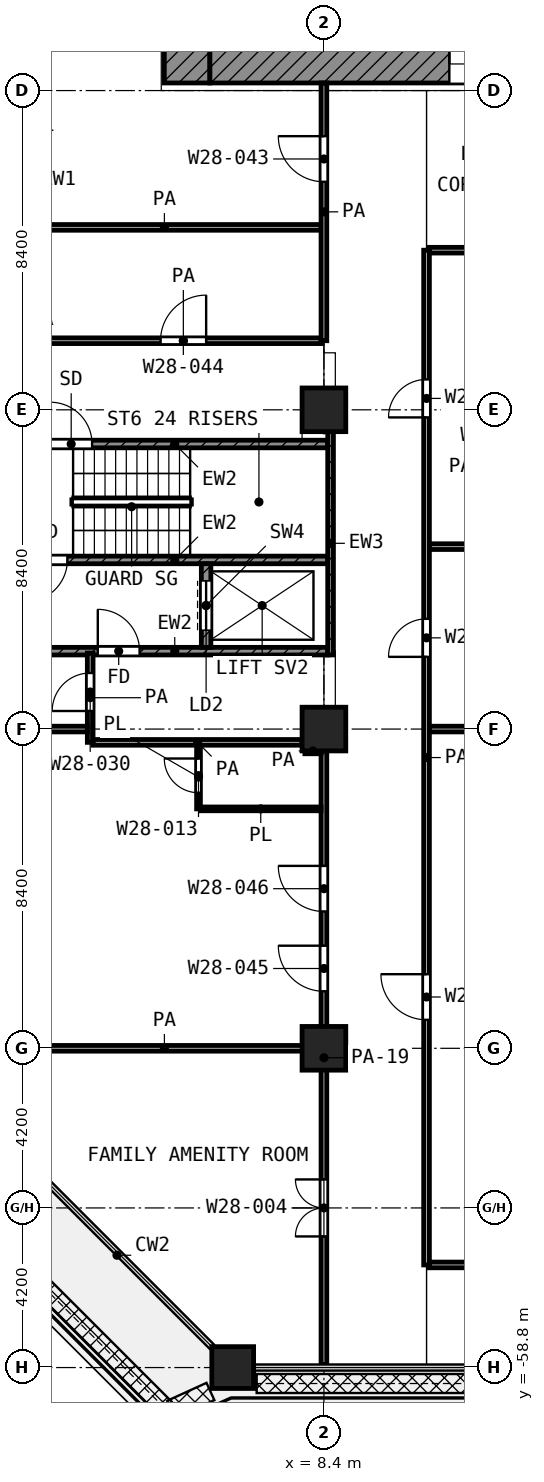
"""IFC4 building model, lengths in metres.
Left out: names, types, materials, properties, quantities, classifications, styles, units other than length and angle.
Written with IfcOpenShell. Run it as: python <this file> out.ifc"""

import sys

from ifc_helpers import new_model, si_unit, direction, frame, frame_2d, origin, origin_2d, place, context, subcontext, project, spatial, rectangle, extrude, element, fill, save


model = new_model("IFC4")
c1 = context("Model", 3, precision=1e-05, world=origin(), true_north=direction((0.0, 1.0)))
c2 = subcontext(c1, "Body", "Model", "MODEL_VIEW")
j1 = project(units=[si_unit("LENGTHUNIT", "METRE"), si_unit("PLANEANGLEUNIT", "RADIAN")], contexts=[c1])
p1 = place(None, origin())
s1 = spatial("IfcSite", under=j1, at=p1, CompositionType="ELEMENT")
p2 = place(p1, origin())
s2 = spatial("IfcBuilding", under=s1, at=p2, CompositionType="ELEMENT")
p3 = place(p2, frame((0.0, 0.0, 124.0)))
s3 = spatial("IfcBuildingStorey", under=s2, at=p3, CompositionType="ELEMENT", Elevation=124.0)
for number, where, z_axis, x_axis in (
    (1, (8.4, -33.6, 0.0), (0.0, 0.0, 1.0), (1.0, 0.0, 0.0)),
    (2, (8.4, -42.0, 0.0), (0.0, 0.0, 1.0), (1.0, 0.0, 0.0)),
    (3, (8.4, -50.4, 0.0), (0.0, 0.0, 1.0), (1.0, 0.0, 0.0)),
):
    element("IfcColumn", number, at=place(p3, frame(where, z_axis=z_axis, x_axis=x_axis)), inside=s3, PredefinedType="COLUMN", context=c2, shape_type="SweptSolid", body=[
        extrude(rectangle(XDim=1.15, YDim=1.15, at=origin_2d()), origin(), (0.0, 0.0, 1.0), 4.2),
    ])
p4 = place(p3, frame((6.0, -58.8, 0.0), z_axis=(0.0, 0.0, 1.0), x_axis=(1.0, 0.0, 0.0)))
e4 = element("IfcColumn", 4, at=p4, inside=s3, PredefinedType="COLUMN", context=c2, shape_type="SweptSolid", body=[
    extrude(rectangle(XDim=1.1, YDim=1.1, at=origin_2d()), origin(), (0.0, 0.0, 1.0), 4.2),
])
p5 = place(p3, frame((4.8, -25.0, 0.0), z_axis=(0.0, 0.0, 1.0), x_axis=(0.0, 1.0, 0.0)))
e5 = element("IfcWall", 5, at=p5, inside=s3, PredefinedType="SHEAR", context=c2, shape_type="SweptSolid", body=[
    extrude(rectangle(XDim=19.6, YDim=1.2, at=frame_2d((9.8, 0.0))), origin(), (0.0, 0.0, 1.0), 3.6),
])
p6 = place(p5, frame((11.45, 0.0, 0.0)))
e6 = element("IfcOpeningElement", 6, at=p6, cuts=e5, PredefinedType="OPENING", context=c2, shape_type="SweptSolid", body=[
    extrude(rectangle(XDim=1.1, YDim=2.1, at=frame_2d((0.55, 1.05))), frame((0.0, 0.61, 0.0), z_axis=(0.0, -1.0, 0.0), x_axis=(1.0, 0.0, 0.0)), (0.0, 0.0, 1.0), 1.22),
])
p7 = place(p5, frame((2.15, 0.0, 0.0)))
e7 = element("IfcOpeningElement", 7, at=p7, cuts=e5, PredefinedType="OPENING", context=c2, shape_type="SweptSolid", body=[
    extrude(rectangle(XDim=1.1, YDim=2.1, at=frame_2d((0.55, 1.05))), frame((0.0, 0.61, 0.0), z_axis=(0.0, -1.0, 0.0), x_axis=(1.0, 0.0, 0.0)), (0.0, 0.0, 1.0), 1.22),
])
p8 = place(p3, frame((5.4, -24.5, 0.0), z_axis=(0.0, 0.0, 1.0), x_axis=(1.0, 0.0, 0.0)))
e8 = element("IfcWall", 8, at=p8, inside=s3, PredefinedType="SHEAR", context=c2, shape_type="SweptSolid", body=[
    extrude(rectangle(XDim=18.6, YDim=1.0, at=frame_2d((9.3, 0.0))), origin(), (0.0, 0.0, 1.0), 3.6),
])
p9 = place(p8, frame((6.3, 0.0, 0.0)))
e9 = element("IfcOpeningElement", 9, at=p9, cuts=e8, PredefinedType="OPENING", context=c2, shape_type="SweptSolid", body=[
    extrude(rectangle(XDim=1.8, YDim=2.1, at=frame_2d((0.9, 1.05))), frame((0.0, 0.51, 0.0), z_axis=(0.0, -1.0, 0.0), x_axis=(1.0, 0.0, 0.0)), (0.0, 0.0, 1.0), 1.02),
])
p10 = place(p3, frame((8.575, -40.05, 0.0), z_axis=(0.0, 0.0, 1.0), x_axis=(0.0, 1.0, 0.0)))
e10 = element("IfcWall", 10, at=p10, inside=s3, PredefinedType="SHEAR", context=c2, shape_type="SweptSolid", body=[
    extrude(rectangle(XDim=5.875, YDim=0.15, at=frame_2d((2.938, 0.0))), origin(), (0.0, 0.0, 1.0), 3.6),
])
p11 = place(p3, frame((0.45, -34.5, 0.0), z_axis=(0.0, 0.0, 1.0), x_axis=(1.0, 0.0, 0.0)))
e11 = element("IfcWall", 11, at=p11, inside=s3, PredefinedType="SHEAR", context=c2, shape_type="SweptSolid", body=[
    extrude(rectangle(XDim=8.05, YDim=0.2, at=frame_2d((4.025, 0.0))), origin(), (0.0, 0.0, 1.0), 3.6),
])
p12 = place(p11, frame((0.75, 0.0, 0.0)))
e12 = element("IfcOpeningElement", 12, at=p12, cuts=e11, PredefinedType="OPENING", context=c2, shape_type="SweptSolid", body=[
    extrude(rectangle(XDim=1.1, YDim=2.1, at=frame_2d((0.55, 1.05))), frame((0.0, 0.11, 0.0), z_axis=(0.0, -1.0, 0.0), x_axis=(1.0, 0.0, 0.0)), (0.0, 0.0, 1.0), 0.22),
])
p13 = place(p3, frame((0.45, -37.55, 0.0), z_axis=(0.0, 0.0, 1.0), x_axis=(1.0, 0.0, 0.0)))
e13 = element("IfcWall", 13, at=p13, inside=s3, PredefinedType="SHEAR", context=c2, shape_type="SweptSolid", body=[
    extrude(rectangle(XDim=8.05, YDim=0.2, at=frame_2d((4.025, 0.0))), origin(), (0.0, 0.0, 1.0), 3.6),
])
p14 = place(p13, frame((0.1, 0.0, 0.0)))
e14 = element("IfcOpeningElement", 14, at=p14, cuts=e13, PredefinedType="OPENING", context=c2, shape_type="SweptSolid", body=[
    extrude(rectangle(XDim=1.1, YDim=2.1, at=frame_2d((0.55, 1.05))), frame((0.0, 0.11, 0.0), z_axis=(0.0, -1.0, 0.0), x_axis=(1.0, 0.0, 0.0)), (0.0, 0.0, 1.0), 0.22),
])
p15 = place(p3, frame((0.45, -39.95, 0.0), z_axis=(0.0, 0.0, 1.0), x_axis=(1.0, 0.0, 0.0)))
e15 = element("IfcWall", 15, at=p15, inside=s3, PredefinedType="SHEAR", context=c2, shape_type="SweptSolid", body=[
    extrude(rectangle(XDim=8.05, YDim=0.2, at=frame_2d((4.025, 0.0))), origin(), (0.0, 0.0, 1.0), 3.6),
])
p16 = place(p15, frame((2.0, 0.0, 0.0)))
e16 = element("IfcOpeningElement", 16, at=p16, cuts=e15, PredefinedType="OPENING", context=c2, shape_type="SweptSolid", body=[
    extrude(rectangle(XDim=1.1, YDim=2.1, at=frame_2d((0.55, 1.05))), frame((0.0, 0.11, 0.0), z_axis=(0.0, -1.0, 0.0), x_axis=(1.0, 0.0, 0.0)), (0.0, 0.0, 1.0), 0.22),
])
p17 = place(p3, frame((5.3, -39.85, 0.0), z_axis=(0.0, 0.0, 1.0), x_axis=(0.0, 1.0, 0.0)))
e17 = element("IfcWall", 17, at=p17, inside=s3, PredefinedType="SHEAR", context=c2, shape_type="SweptSolid", body=[
    extrude(rectangle(XDim=2.2, YDim=0.25, at=frame_2d((1.1, 0.0))), origin(), (0.0, 0.0, 1.0), 3.6),
])
p18 = place(p17, frame((0.45, 0.0, 0.0)))
e18 = element("IfcOpeningElement", 18, at=p18, cuts=e17, PredefinedType="OPENING", context=c2, shape_type="SweptSolid", body=[
    extrude(rectangle(XDim=1.3, YDim=2.1, at=frame_2d((0.65, 1.05))), frame((0.0, 0.135, 0.0), z_axis=(0.0, -1.0, 0.0), x_axis=(1.0, 0.0, 0.0)), (0.0, 0.0, 1.0), 0.27),
])
p19 = place(p3, frame((5.15, -44.1, 0.0), z_axis=(0.0, 0.0, 1.0), x_axis=(1.0, 0.0, 0.0)))
e19 = element("IfcWall", 19, at=p19, inside=s3, PredefinedType="PARTITIONING", context=c2, shape_type="SweptSolid", body=[
    extrude(rectangle(XDim=3.175, YDim=0.1, at=frame_2d((1.587, 0.0))), origin(), (0.0, 0.0, 1.0), 3.6),
])
p20 = place(p3, frame((5.1, -44.1, 0.0), z_axis=(0.0, 0.0, 1.0), x_axis=(0.0, 1.0, 0.0)))
e20 = element("IfcWall", 20, at=p20, inside=s3, PredefinedType="PARTITIONING", context=c2, shape_type="SweptSolid", body=[
    extrude(rectangle(XDim=1.675, YDim=0.1, at=frame_2d((0.837, 0.0))), origin(), (0.0, 0.0, 1.0), 3.6),
])
p21 = place(p20, frame((0.425, 0.0, 0.0)))
e21 = element("IfcOpeningElement", 21, at=p21, cuts=e20, PredefinedType="OPENING", context=c2, shape_type="SweptSolid", body=[
    extrude(rectangle(XDim=0.9, YDim=2.1, at=frame_2d((0.45, 1.05))), frame((0.0, 0.06, 0.0), z_axis=(0.0, -1.0, 0.0), x_axis=(1.0, 0.0, 0.0)), (0.0, 0.0, 1.0), 0.12),
])
p22 = place(p3, frame((11.175, -56.1, 0.0), z_axis=(0.0, 0.0, 1.0), x_axis=(1.0, 0.0, 0.0)))
e22 = element("IfcWall", 22, at=p22, inside=s3, PredefinedType="PARTITIONING", context=c2, shape_type="SweptSolid", body=[
    extrude(rectangle(XDim=2.85, YDim=0.15, at=frame_2d((1.425, 0.0))), origin(), (0.0, 0.0, 1.0), 3.6),
])
p23 = place(p3, frame((0.08, -50.4, 0.0), z_axis=(0.0, 0.0, 1.0), x_axis=(1.0, 0.0, 0.0)))
e23 = element("IfcWall", 23, at=p23, inside=s3, PredefinedType="PARTITIONING", context=c2, shape_type="SweptSolid", body=[
    extrude(rectangle(XDim=8.245, YDim=0.15, at=frame_2d((4.123, 0.0))), origin(), (0.0, 0.0, 1.0), 3.6),
])
p24 = place(p3, frame((7.9, -42.575, 0.0), z_axis=(0.0, 0.0, 1.0), x_axis=(1.0, 0.0, 0.0)))
e24 = element("IfcWall", 24, at=p24, inside=s3, PredefinedType="PARTITIONING", context=c2, shape_type="SweptSolid", body=[
    extrude(rectangle(XDim=0.425, YDim=0.15, at=frame_2d((0.212, 0.0))), origin(), (0.0, 0.0, 1.0), 3.6),
])
p25 = place(p3, frame((2.325, -42.35, 0.0), z_axis=(0.0, 0.0, 1.0), x_axis=(1.0, 0.0, 0.0)))
e25 = element("IfcWall", 25, at=p25, inside=s3, PredefinedType="PARTITIONING", context=c2, shape_type="SweptSolid", body=[
    extrude(rectangle(XDim=5.498, YDim=0.15, at=frame_2d((2.749, 0.0))), origin(), (0.0, 0.0, 1.0), 3.6),
])
p26 = place(p3, frame((0.08, -42.0, 0.0), z_axis=(0.0, 0.0, 1.0), x_axis=(1.0, 0.0, 0.0)))
e26 = element("IfcWall", 26, at=p26, inside=s3, PredefinedType="PARTITIONING", context=c2, shape_type="SweptSolid", body=[
    extrude(rectangle(XDim=2.095, YDim=0.15, at=frame_2d((1.047, 0.0))), origin(), (0.0, 0.0, 1.0), 3.6),
])
for number, where, z_axis, x_axis in (
    (27, (11.175, -42.0, 0.0), (0.0, 0.0, 1.0), (1.0, 0.0, 0.0)),
    (28, (11.175, -37.2, 0.0), (0.0, 0.0, 1.0), (1.0, 0.0, 0.0)),
):
    element("IfcWall", number, at=place(p3, frame(where, z_axis=z_axis, x_axis=x_axis)), inside=s3, PredefinedType="PARTITIONING", context=c2, shape_type="SweptSolid", body=[
        extrude(rectangle(XDim=2.85, YDim=0.15, at=frame_2d((1.425, 0.0))), origin(), (0.0, 0.0, 1.0), 3.6),
    ])
p27 = place(p3, frame((1.077, -31.782, 0.0), z_axis=(0.0, 0.0, 1.0), x_axis=(1.0, 0.0, 0.0)))
e29 = element("IfcWall", 29, at=p27, inside=s3, PredefinedType="PARTITIONING", context=c2, shape_type="SweptSolid", body=[
    extrude(rectangle(XDim=7.248, YDim=0.15, at=frame_2d((3.624, 0.0))), origin(), (0.0, 0.0, 1.0), 3.6),
])
p28 = place(p27, frame((3.024, 0.0, 0.0)))
e30 = element("IfcOpeningElement", 30, at=p28, cuts=e29, PredefinedType="OPENING", context=c2, shape_type="SweptSolid", body=[
    extrude(rectangle(XDim=1.2, YDim=2.1, at=frame_2d((0.6, 1.05))), frame((0.0, 0.085, 0.0), z_axis=(0.0, -1.0, 0.0), x_axis=(1.0, 0.0, 0.0)), (0.0, 0.0, 1.0), 0.17),
])
p29 = place(p3, frame((11.175, -29.4, 0.0), z_axis=(0.0, 0.0, 1.0), x_axis=(1.0, 0.0, 0.0)))
e31 = element("IfcWall", 31, at=p29, inside=s3, PredefinedType="PARTITIONING", context=c2, shape_type="SweptSolid", body=[
    extrude(rectangle(XDim=2.85, YDim=0.15, at=frame_2d((1.425, 0.0))), origin(), (0.0, 0.0, 1.0), 3.6),
])
p30 = place(p3, frame((0.08, -28.8, 0.0), z_axis=(0.0, 0.0, 1.0), x_axis=(1.0, 0.0, 0.0)))
e32 = element("IfcWall", 32, at=p30, inside=s3, PredefinedType="PARTITIONING", context=c2, shape_type="SweptSolid", body=[
    extrude(rectangle(XDim=8.245, YDim=0.15, at=frame_2d((4.123, 0.0))), origin(), (0.0, 0.0, 1.0), 3.6),
])
p31 = place(p3, frame((2.25, -42.35, 0.0), z_axis=(0.0, 0.0, 1.0), x_axis=(0.0, 1.0, 0.0)))
e33 = element("IfcWall", 33, at=p31, inside=s3, PredefinedType="PARTITIONING", context=c2, shape_type="SweptSolid", body=[
    extrude(rectangle(XDim=2.35, YDim=0.15, at=frame_2d((1.175, 0.0))), origin(), (0.0, 0.0, 1.0), 3.6),
])
p32 = place(p31, frame((0.825, 0.0, 0.0)))
e34 = element("IfcOpeningElement", 34, at=p32, cuts=e33, PredefinedType="OPENING", context=c2, shape_type="SweptSolid", body=[
    extrude(rectangle(XDim=1.0, YDim=2.1, at=frame_2d((0.5, 1.05))), frame((0.0, 0.085, 0.0), z_axis=(0.0, -1.0, 0.0), x_axis=(1.0, 0.0, 0.0)), (0.0, 0.0, 1.0), 0.17),
])
p33 = place(p3, frame((8.4, -58.72, 0.0), z_axis=(0.0, 0.0, 1.0), x_axis=(0.0, 1.0, 0.0)))
e35 = element("IfcWall", 35, at=p33, inside=s3, PredefinedType="PARTITIONING", context=c2, shape_type="SweptSolid", body=[
    extrude(rectangle(XDim=16.145, YDim=0.15, at=frame_2d((8.073, 0.0))), origin(), (0.0, 0.0, 1.0), 2.7),
])
p34 = place(p33, frame((9.82, 0.0, 0.0)))
e36 = element("IfcOpeningElement", 36, at=p34, cuts=e35, PredefinedType="OPENING", context=c2, shape_type="SweptSolid", body=[
    extrude(rectangle(XDim=1.2, YDim=2.1, at=frame_2d((0.6, 1.05))), frame((0.0, 0.085, 0.0), z_axis=(0.0, -1.0, 0.0), x_axis=(1.0, 0.0, 0.0)), (0.0, 0.0, 1.0), 0.17),
])
p35 = place(p33, frame((11.92, 0.0, 0.0)))
e37 = element("IfcOpeningElement", 37, at=p35, cuts=e35, PredefinedType="OPENING", context=c2, shape_type="SweptSolid", body=[
    extrude(rectangle(XDim=1.2, YDim=2.1, at=frame_2d((0.6, 1.05))), frame((0.0, 0.085, 0.0), z_axis=(0.0, -1.0, 0.0), x_axis=(1.0, 0.0, 0.0)), (0.0, 0.0, 1.0), 0.17),
])
p36 = place(p33, frame((3.37, 0.0, 0.0)))
e38 = element("IfcOpeningElement", 38, at=p36, cuts=e35, PredefinedType="OPENING", context=c2, shape_type="SweptSolid", body=[
    extrude(rectangle(XDim=1.5, YDim=2.1, at=frame_2d((0.75, 1.05))), frame((0.0, 0.085, 0.0), z_axis=(0.0, -1.0, 0.0), x_axis=(1.0, 0.0, 0.0)), (0.0, 0.0, 1.0), 0.17),
])
p37 = place(p3, frame((8.4, -31.782, 0.0), z_axis=(0.0, 0.0, 1.0), x_axis=(0.0, 1.0, 0.0)))
e39 = element("IfcWall", 39, at=p37, inside=s3, PredefinedType="PARTITIONING", context=c2, shape_type="SweptSolid", body=[
    extrude(rectangle(XDim=6.782, YDim=0.15, at=frame_2d((3.391, 0.0))), origin(), (0.0, 0.0, 1.0), 3.6),
])
p38 = place(p37, frame((4.182, 0.0, 0.0)))
e40 = element("IfcOpeningElement", 40, at=p38, cuts=e39, PredefinedType="OPENING", context=c2, shape_type="SweptSolid", body=[
    extrude(rectangle(XDim=1.2, YDim=2.1, at=frame_2d((0.6, 1.05))), frame((0.0, 0.085, 0.0), z_axis=(0.0, -1.0, 0.0), x_axis=(1.0, 0.0, 0.0)), (0.0, 0.0, 1.0), 0.17),
])
p39 = place(p3, frame((11.1, -56.1, 0.0), z_axis=(0.0, 0.0, 1.0), x_axis=(0.0, 1.0, 0.0)))
e41 = element("IfcWall", 41, at=p39, inside=s3, PredefinedType="PARTITIONING", context=c2, shape_type="SweptSolid", body=[
    extrude(rectangle(XDim=26.7, YDim=0.15, at=frame_2d((13.35, 0.0))), origin(), (0.0, 0.0, 1.0), 3.6),
])
p40 = place(p39, frame((22.3, 0.0, 0.0)))
e42 = element("IfcOpeningElement", 42, at=p40, cuts=e41, PredefinedType="OPENING", context=c2, shape_type="SweptSolid", body=[
    extrude(rectangle(XDim=1.0, YDim=2.1, at=frame_2d((0.5, 1.05))), frame((0.0, 0.085, 0.0), z_axis=(0.0, -1.0, 0.0), x_axis=(1.0, 0.0, 0.0)), (0.0, 0.0, 1.0), 0.17),
])
p41 = place(p39, frame((16.0, 0.0, 0.0)))
e43 = element("IfcOpeningElement", 43, at=p41, cuts=e41, PredefinedType="OPENING", context=c2, shape_type="SweptSolid", body=[
    extrude(rectangle(XDim=1.0, YDim=2.1, at=frame_2d((0.5, 1.05))), frame((0.0, 0.085, 0.0), z_axis=(0.0, -1.0, 0.0), x_axis=(1.0, 0.0, 0.0)), (0.0, 0.0, 1.0), 0.17),
])
p42 = place(p39, frame((6.45, 0.0, 0.0)))
e44 = element("IfcOpeningElement", 44, at=p42, cuts=e41, PredefinedType="OPENING", context=c2, shape_type="SweptSolid", body=[
    extrude(rectangle(XDim=1.2, YDim=2.1, at=frame_2d((0.6, 1.05))), frame((0.0, 0.085, 0.0), z_axis=(0.0, -1.0, 0.0), x_axis=(1.0, 0.0, 0.0)), (0.0, 0.0, 1.0), 0.17),
])
p43 = place(p9, origin())
e45 = element("IfcDoor", 45, at=p43, inside=s3, OperationType="DOUBLE_DOOR_SINGLE_SWING", PredefinedType="DOOR", context=c2, shape_type="SweptSolid", body=[
    extrude(rectangle(XDim=1.8, YDim=2.1, at=frame_2d((0.9, 1.05))), frame((0.0, 0.025, 0.0), z_axis=(0.0, -1.0, 0.0), x_axis=(1.0, 0.0, 0.0)), (0.0, 0.0, 1.0), 0.05),
])
fill(e9, e45)
p44 = place(p12, origin())
e46 = element("IfcDoor", 46, at=p44, inside=s3, OperationType="SINGLE_SWING_LEFT", PredefinedType="DOOR", context=c2, shape_type="SweptSolid", body=[
    extrude(rectangle(XDim=1.1, YDim=2.1, at=frame_2d((0.55, 1.05))), frame((0.0, 0.025, 0.0), z_axis=(0.0, -1.0, 0.0), x_axis=(1.0, 0.0, 0.0)), (0.0, 0.0, 1.0), 0.05),
])
fill(e12, e46)
p45 = place(p14, frame((1.1, 0.0, 0.0), z_axis=(0.0, 0.0, 1.0), x_axis=(-1.0, 0.0, 0.0)))
e47 = element("IfcDoor", 47, at=p45, inside=s3, OperationType="SINGLE_SWING_LEFT", PredefinedType="DOOR", context=c2, shape_type="SweptSolid", body=[
    extrude(rectangle(XDim=1.1, YDim=2.1, at=frame_2d((0.55, 1.05))), frame((0.0, 0.025, 0.0), z_axis=(0.0, -1.0, 0.0), x_axis=(1.0, 0.0, 0.0)), (0.0, 0.0, 1.0), 0.05),
])
fill(e14, e47)
p46 = place(p18, origin())
e48 = element("IfcDoor", 48, at=p46, inside=s3, OperationType="DOUBLE_DOOR_SLIDING", PredefinedType="DOOR", context=c2, shape_type="SweptSolid", body=[
    extrude(rectangle(XDim=1.3, YDim=2.1, at=frame_2d((0.65, 1.05))), frame((0.0, 0.025, 0.0), z_axis=(0.0, -1.0, 0.0), x_axis=(1.0, 0.0, 0.0)), (0.0, 0.0, 1.0), 0.05),
])
fill(e18, e48)
p47 = place(p16, origin())
e49 = element("IfcDoor", 49, at=p47, inside=s3, OperationType="SINGLE_SWING_LEFT", PredefinedType="DOOR", context=c2, shape_type="SweptSolid", body=[
    extrude(rectangle(XDim=1.1, YDim=2.1, at=frame_2d((0.55, 1.05))), frame((0.0, 0.025, 0.0), z_axis=(0.0, -1.0, 0.0), x_axis=(1.0, 0.0, 0.0)), (0.0, 0.0, 1.0), 0.05),
])
fill(e16, e49)
p48 = place(p38, origin())
e50 = element("IfcDoor", 50, at=p48, inside=s3, OperationType="SINGLE_SWING_RIGHT", PredefinedType="DOOR", context=c2, shape_type="SweptSolid", body=[
    extrude(rectangle(XDim=1.2, YDim=2.1, at=frame_2d((0.6, 1.05))), frame((0.0, 0.025, 0.0), z_axis=(0.0, -1.0, 0.0), x_axis=(1.0, 0.0, 0.0)), (0.0, 0.0, 1.0), 0.05),
])
fill(e40, e50)
p49 = place(p28, origin())
e51 = element("IfcDoor", 51, at=p49, inside=s3, OperationType="SINGLE_SWING_RIGHT", PredefinedType="DOOR", context=c2, shape_type="SweptSolid", body=[
    extrude(rectangle(XDim=1.2, YDim=2.1, at=frame_2d((0.6, 1.05))), frame((0.0, 0.025, 0.0), z_axis=(0.0, -1.0, 0.0), x_axis=(1.0, 0.0, 0.0)), (0.0, 0.0, 1.0), 0.05),
])
fill(e30, e51)
p50 = place(p32, origin())
e52 = element("IfcDoor", 52, at=p50, inside=s3, OperationType="SINGLE_SWING_LEFT", PredefinedType="DOOR", context=c2, shape_type="SweptSolid", body=[
    extrude(rectangle(XDim=1.0, YDim=2.1, at=frame_2d((0.5, 1.05))), frame((0.0, 0.025, 0.0), z_axis=(0.0, -1.0, 0.0), x_axis=(1.0, 0.0, 0.0)), (0.0, 0.0, 1.0), 0.05),
])
fill(e34, e52)
p51 = place(p34, origin())
e53 = element("IfcDoor", 53, at=p51, inside=s3, OperationType="SINGLE_SWING_RIGHT", PredefinedType="DOOR", context=c2, shape_type="SweptSolid", body=[
    extrude(rectangle(XDim=1.2, YDim=2.1, at=frame_2d((0.6, 1.05))), frame((0.0, 0.025, 0.0), z_axis=(0.0, -1.0, 0.0), x_axis=(1.0, 0.0, 0.0)), (0.0, 0.0, 1.0), 0.05),
])
fill(e36, e53)
p52 = place(p35, origin())
e54 = element("IfcDoor", 54, at=p52, inside=s3, OperationType="SINGLE_SWING_RIGHT", PredefinedType="DOOR", context=c2, shape_type="SweptSolid", body=[
    extrude(rectangle(XDim=1.2, YDim=2.1, at=frame_2d((0.6, 1.05))), frame((0.0, 0.025, 0.0), z_axis=(0.0, -1.0, 0.0), x_axis=(1.0, 0.0, 0.0)), (0.0, 0.0, 1.0), 0.05),
])
fill(e37, e54)
p53 = place(p21, origin())
e55 = element("IfcDoor", 55, at=p53, inside=s3, OperationType="SINGLE_SWING_RIGHT", PredefinedType="DOOR", context=c2, shape_type="SweptSolid", body=[
    extrude(rectangle(XDim=0.9, YDim=2.1, at=frame_2d((0.45, 1.05))), frame((0.0, 0.025, 0.0), z_axis=(0.0, -1.0, 0.0), x_axis=(1.0, 0.0, 0.0)), (0.0, 0.0, 1.0), 0.05),
])
fill(e21, e55)
p54 = place(p36, origin())
e56 = element("IfcDoor", 56, at=p54, inside=s3, OperationType="DOUBLE_DOOR_SINGLE_SWING", PredefinedType="DOOR", context=c2, shape_type="SweptSolid", body=[
    extrude(rectangle(XDim=1.5, YDim=2.1, at=frame_2d((0.75, 1.05))), frame((0.0, 0.025, 0.0), z_axis=(0.0, -1.0, 0.0), x_axis=(1.0, 0.0, 0.0)), (0.0, 0.0, 1.0), 0.05),
])
fill(e38, e56)
p55 = place(p40, origin())
e57 = element("IfcDoor", 57, at=p55, inside=s3, OperationType="SINGLE_SWING_LEFT", PredefinedType="DOOR", context=c2, shape_type="SweptSolid", body=[
    extrude(rectangle(XDim=1.0, YDim=2.1, at=frame_2d((0.5, 1.05))), frame((0.0, 0.025, 0.0), z_axis=(0.0, -1.0, 0.0), x_axis=(1.0, 0.0, 0.0)), (0.0, 0.0, 1.0), 0.05),
])
fill(e42, e57)
p56 = place(p41, origin())
e58 = element("IfcDoor", 58, at=p56, inside=s3, OperationType="SINGLE_SWING_LEFT", PredefinedType="DOOR", context=c2, shape_type="SweptSolid", body=[
    extrude(rectangle(XDim=1.0, YDim=2.1, at=frame_2d((0.5, 1.05))), frame((0.0, 0.025, 0.0), z_axis=(0.0, -1.0, 0.0), x_axis=(1.0, 0.0, 0.0)), (0.0, 0.0, 1.0), 0.05),
])
fill(e43, e58)
p57 = place(p42, origin())
e59 = element("IfcDoor", 59, at=p57, inside=s3, OperationType="SINGLE_SWING_RIGHT", PredefinedType="DOOR", context=c2, shape_type="SweptSolid", body=[
    extrude(rectangle(XDim=1.2, YDim=2.1, at=frame_2d((0.6, 1.05))), frame((0.0, 0.025, 0.0), z_axis=(0.0, -1.0, 0.0), x_axis=(1.0, 0.0, 0.0)), (0.0, 0.0, 1.0), 0.05),
])
fill(e44, e59)
save(model, sys.argv[1])
